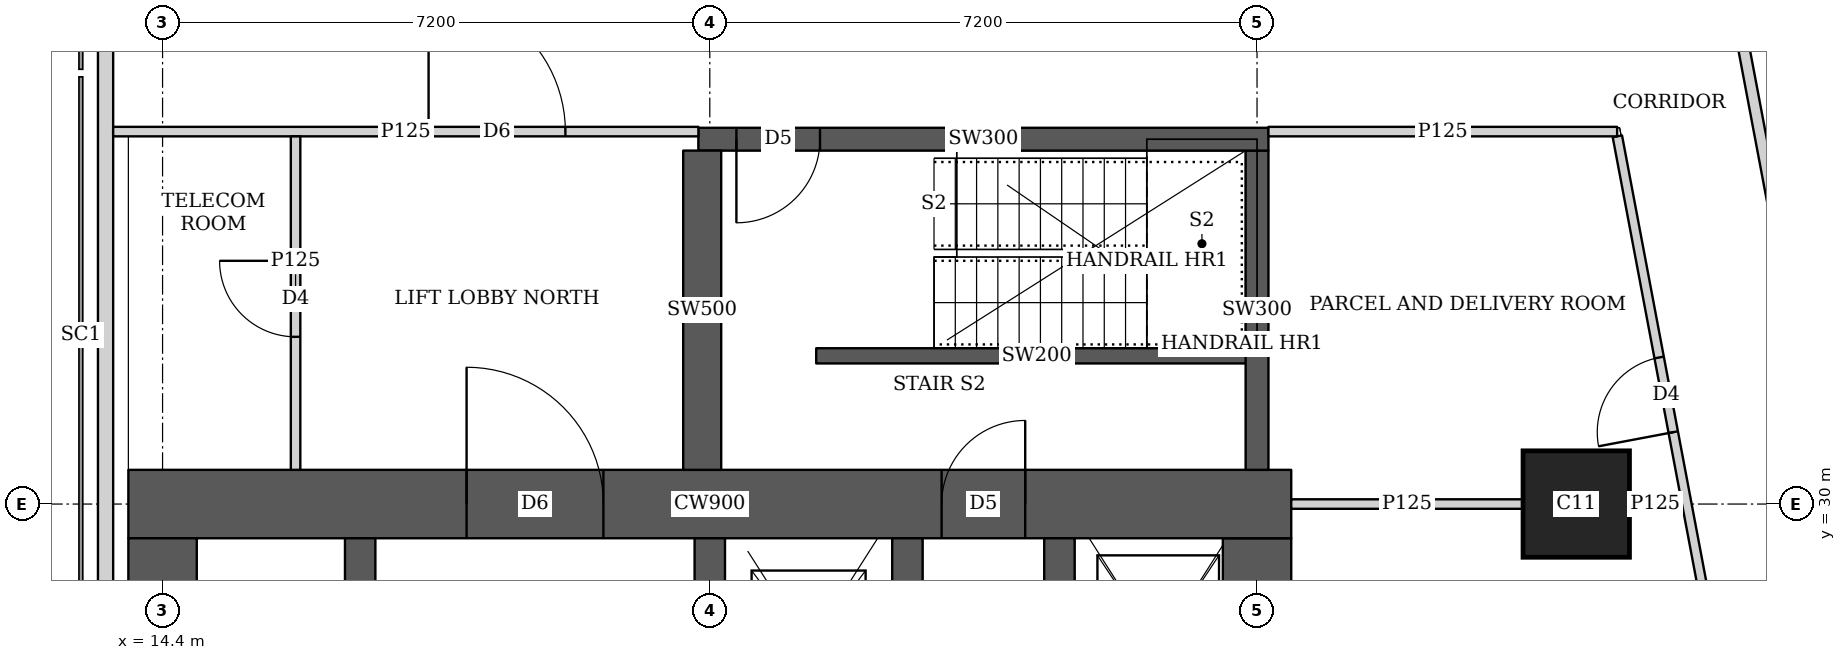
"""IFC4 building model, lengths in metres.
Left out: names, types, materials, properties, quantities, classifications, styles, units other than length and angle.
Written with IfcOpenShell. Run it as: python <this file> out.ifc"""

import sys

from ifc_helpers import new_model, si_unit, direction, frame, frame_2d, origin, origin_2d, place, context, subcontext, project, spatial, rectangle, extrude, element, fill, save


model = new_model("IFC4")
c1 = context("Model", 3, precision=1e-05, world=origin(), true_north=direction((0.0, 1.0)))
c2 = subcontext(c1, "Body", "Model", "MODEL_VIEW")
j1 = project(units=[si_unit("LENGTHUNIT", "METRE"), si_unit("PLANEANGLEUNIT", "RADIAN")], contexts=[c1])
p1 = place(None, origin())
s1 = spatial("IfcSite", under=j1, at=p1, CompositionType="ELEMENT")
p2 = place(p1, origin())
s2 = spatial("IfcBuilding", under=s1, at=p2, CompositionType="ELEMENT")
p3 = place(p2, frame((0.0, 0.0, 266.6)))
s3 = spatial("IfcBuildingStorey", under=s2, at=p3, CompositionType="ELEMENT", Elevation=266.6)
p4 = place(p3, frame((33.0, 30.0, 0.0), z_axis=(0.0, 0.0, 1.0), x_axis=(1.0, 0.0, 0.0)))
e1 = element("IfcColumn", 1, at=p4, inside=s3, PredefinedType="COLUMN", context=c2, shape_type="SweptSolid", body=[
    extrude(rectangle(XDim=1.4, YDim=1.4, at=origin_2d()), origin(), (0.0, 0.0, 1.0), 3.75),
])
p5 = place(p3, frame((13.95, 30.0, 0.0), z_axis=(0.0, 0.0, 1.0), x_axis=(1.0, 0.0, 0.0)))
e2 = element("IfcWall", 2, at=p5, inside=s3, PredefinedType="SHEAR", context=c2, shape_type="SweptSolid", body=[
    extrude(rectangle(XDim=15.3, YDim=0.9, at=frame_2d((7.65, 0.0))), origin(), (0.0, 0.0, 1.0), 3.75),
])
p6 = place(p5, frame((4.45, 0.0, 0.0)))
e3 = element("IfcOpeningElement", 3, at=p6, cuts=e2, PredefinedType="OPENING", context=c2, shape_type="SweptSolid", body=[
    extrude(rectangle(XDim=1.8, YDim=2.1, at=frame_2d((0.9, 1.05))), frame((0.0, 0.46, 0.0), z_axis=(0.0, -1.0, 0.0), x_axis=(1.0, 0.0, 0.0)), (0.0, 0.0, 1.0), 0.92),
])
p7 = place(p5, frame((10.7, 0.0, 0.0)))
e4 = element("IfcOpeningElement", 4, at=p7, cuts=e2, PredefinedType="OPENING", context=c2, shape_type="SweptSolid", body=[
    extrude(rectangle(XDim=1.1, YDim=2.1, at=frame_2d((0.55, 1.05))), frame((0.0, 0.46, 0.0), z_axis=(0.0, -1.0, 0.0), x_axis=(1.0, 0.0, 0.0)), (0.0, 0.0, 1.0), 0.92),
])
for number, where, z_axis, x_axis in (
    (5, (14.4, 15.45, 0.0), (0.0, 0.0, 1.0), (0.0, 1.0, 0.0)),
    (6, (28.8, 15.45, 0.0), (0.0, 0.0, 1.0), (0.0, 1.0, 0.0)),
):
    element("IfcWall", number, at=place(p3, frame(where, z_axis=z_axis, x_axis=x_axis)), inside=s3, PredefinedType="SHEAR", context=c2, shape_type="SweptSolid", body=[
        extrude(rectangle(XDim=14.1, YDim=0.9, at=frame_2d((7.05, 0.0))), origin(), (0.0, 0.0, 1.0), 3.75),
    ])
p8 = place(p3, frame((17.0, 15.45, 0.0), z_axis=(0.0, 0.0, 1.0), x_axis=(0.0, 1.0, 0.0)))
e7 = element("IfcWall", 7, at=p8, inside=s3, PredefinedType="SHEAR", context=c2, shape_type="SweptSolid", body=[
    extrude(rectangle(XDim=14.1, YDim=0.4, at=frame_2d((7.05, 0.0))), origin(), (0.0, 0.0, 1.0), 3.75),
])
p9 = place(p8, frame((1.05, 0.0, 0.0)))
e8 = element("IfcOpeningElement", 8, at=p9, cuts=e7, PredefinedType="OPENING", context=c2, shape_type="SweptSolid", body=[
    extrude(rectangle(XDim=1.0, YDim=2.1, at=frame_2d((0.5, 1.05))), frame((0.0, 0.21, 0.0), z_axis=(0.0, -1.0, 0.0), x_axis=(1.0, 0.0, 0.0)), (0.0, 0.0, 1.0), 0.42),
])
p10 = place(p8, frame((4.675, 0.0, 0.0)))
e9 = element("IfcOpeningElement", 9, at=p10, cuts=e7, PredefinedType="OPENING", context=c2, shape_type="SweptSolid", body=[
    extrude(rectangle(XDim=1.0, YDim=2.1, at=frame_2d((0.5, 1.05))), frame((0.0, 0.21, 0.0), z_axis=(0.0, -1.0, 0.0), x_axis=(1.0, 0.0, 0.0)), (0.0, 0.0, 1.0), 0.42),
])
p11 = place(p8, frame((8.425, 0.0, 0.0)))
e10 = element("IfcOpeningElement", 10, at=p11, cuts=e7, PredefinedType="OPENING", context=c2, shape_type="SweptSolid", body=[
    extrude(rectangle(XDim=1.0, YDim=2.1, at=frame_2d((0.5, 1.05))), frame((0.0, 0.21, 0.0), z_axis=(0.0, -1.0, 0.0), x_axis=(1.0, 0.0, 0.0)), (0.0, 0.0, 1.0), 0.42),
])
p12 = place(p8, frame((12.175, 0.0, 0.0)))
e11 = element("IfcOpeningElement", 11, at=p12, cuts=e7, PredefinedType="OPENING", context=c2, shape_type="SweptSolid", body=[
    extrude(rectangle(XDim=1.0, YDim=2.1, at=frame_2d((0.5, 1.05))), frame((0.0, 0.21, 0.0), z_axis=(0.0, -1.0, 0.0), x_axis=(1.0, 0.0, 0.0)), (0.0, 0.0, 1.0), 0.42),
])
p13 = place(p3, frame((21.6, 15.45, 0.0), z_axis=(0.0, 0.0, 1.0), x_axis=(0.0, 1.0, 0.0)))
e12 = element("IfcWall", 12, at=p13, inside=s3, PredefinedType="SHEAR", context=c2, shape_type="SweptSolid", body=[
    extrude(rectangle(XDim=14.1, YDim=0.4, at=frame_2d((7.05, 0.0))), origin(), (0.0, 0.0, 1.0), 3.75),
])
p14 = place(p13, frame((0.875, 0.0, 0.0)))
e13 = element("IfcOpeningElement", 13, at=p14, cuts=e12, PredefinedType="OPENING", context=c2, shape_type="SweptSolid", body=[
    extrude(rectangle(XDim=1.1, YDim=2.1, at=frame_2d((0.55, 1.05))), frame((0.0, 0.21, 0.0), z_axis=(0.0, -1.0, 0.0), x_axis=(1.0, 0.0, 0.0)), (0.0, 0.0, 1.0), 0.42),
])
p15 = place(p13, frame((4.625, 0.0, 0.0)))
e14 = element("IfcOpeningElement", 14, at=p15, cuts=e12, PredefinedType="OPENING", context=c2, shape_type="SweptSolid", body=[
    extrude(rectangle(XDim=1.1, YDim=2.1, at=frame_2d((0.55, 1.05))), frame((0.0, 0.21, 0.0), z_axis=(0.0, -1.0, 0.0), x_axis=(1.0, 0.0, 0.0)), (0.0, 0.0, 1.0), 0.42),
])
p16 = place(p13, frame((8.375, 0.0, 0.0)))
e15 = element("IfcOpeningElement", 15, at=p16, cuts=e12, PredefinedType="OPENING", context=c2, shape_type="SweptSolid", body=[
    extrude(rectangle(XDim=1.1, YDim=2.1, at=frame_2d((0.55, 1.05))), frame((0.0, 0.21, 0.0), z_axis=(0.0, -1.0, 0.0), x_axis=(1.0, 0.0, 0.0)), (0.0, 0.0, 1.0), 0.42),
])
p17 = place(p13, frame((12.125, 0.0, 0.0)))
e16 = element("IfcOpeningElement", 16, at=p17, cuts=e12, PredefinedType="OPENING", context=c2, shape_type="SweptSolid", body=[
    extrude(rectangle(XDim=1.1, YDim=2.1, at=frame_2d((0.55, 1.05))), frame((0.0, 0.21, 0.0), z_axis=(0.0, -1.0, 0.0), x_axis=(1.0, 0.0, 0.0)), (0.0, 0.0, 1.0), 0.42),
])
p18 = place(p3, frame((24.2, 15.45, 0.0), z_axis=(0.0, 0.0, 1.0), x_axis=(0.0, 1.0, 0.0)))
e17 = element("IfcWall", 17, at=p18, inside=s3, PredefinedType="SHEAR", context=c2, shape_type="SweptSolid", body=[
    extrude(rectangle(XDim=14.1, YDim=0.4, at=frame_2d((7.05, 0.0))), origin(), (0.0, 0.0, 1.0), 3.75),
])
p19 = place(p3, frame((26.2, 26.45, 0.0), z_axis=(0.0, 0.0, 1.0), x_axis=(0.0, 1.0, 0.0)))
e18 = element("IfcWall", 18, at=p19, inside=s3, PredefinedType="SHEAR", context=c2, shape_type="SweptSolid", body=[
    extrude(rectangle(XDim=3.1, YDim=0.4, at=frame_2d((1.55, 0.0))), origin(), (0.0, 0.0, 1.0), 3.75),
])
p20 = place(p19, frame((1.075, 0.0, 0.0)))
e19 = element("IfcOpeningElement", 19, at=p20, cuts=e18, PredefinedType="OPENING", context=c2, shape_type="SweptSolid", body=[
    extrude(rectangle(XDim=1.2, YDim=2.1, at=frame_2d((0.6, 1.05))), frame((0.0, 0.21, 0.0), z_axis=(0.0, -1.0, 0.0), x_axis=(1.0, 0.0, 0.0)), (0.0, 0.0, 1.0), 0.42),
])
p21 = place(p3, frame((21.45, 34.8, 0.0), z_axis=(0.0, 0.0, 1.0), x_axis=(1.0, 0.0, 0.0)))
e20 = element("IfcWall", 20, at=p21, inside=s3, PredefinedType="SHEAR", context=c2, shape_type="SweptSolid", body=[
    extrude(rectangle(XDim=7.5, YDim=0.3, at=frame_2d((3.75, 0.0))), origin(), (0.0, 0.0, 1.0), 3.75),
])
p22 = place(p21, frame((0.5, 0.0, 0.0)))
e21 = element("IfcOpeningElement", 21, at=p22, cuts=e20, PredefinedType="OPENING", context=c2, shape_type="SweptSolid", body=[
    extrude(rectangle(XDim=1.1, YDim=2.1, at=frame_2d((0.55, 1.05))), frame((0.0, 0.16, 0.0), z_axis=(0.0, -1.0, 0.0), x_axis=(1.0, 0.0, 0.0)), (0.0, 0.0, 1.0), 0.32),
])
p23 = place(p3, frame((21.5, 30.45, 0.0), z_axis=(0.0, 0.0, 1.0), x_axis=(0.0, 1.0, 0.0)))
e22 = element("IfcWall", 22, at=p23, inside=s3, PredefinedType="SHEAR", context=c2, shape_type="SweptSolid", body=[
    extrude(rectangle(XDim=4.2, YDim=0.5, at=frame_2d((2.1, 0.0))), origin(), (0.0, 0.0, 1.0), 3.75),
])
p24 = place(p3, frame((28.8, 30.45, 0.0), z_axis=(0.0, 0.0, 1.0), x_axis=(0.0, 1.0, 0.0)))
e23 = element("IfcWall", 23, at=p24, inside=s3, PredefinedType="SHEAR", context=c2, shape_type="SweptSolid", body=[
    extrude(rectangle(XDim=4.2, YDim=0.3, at=frame_2d((2.1, 0.0))), origin(), (0.0, 0.0, 1.0), 3.75),
])
p25 = place(p3, frame((13.65, 43.037, 0.0), z_axis=(0.0, 0.0, 1.0), x_axis=(0.0, -1.0, 0.0)))
e24 = element("IfcWall", 24, at=p25, inside=s3, PredefinedType="SOLIDWALL", context=c2, shape_type="SweptSolid", body=[
    extrude(rectangle(XDim=35.374, YDim=0.2, at=frame_2d((17.687, 0.0))), origin(), (0.0, 0.0, 1.0), 3.5),
])
p26 = place(p25, frame((1.959, 0.0, 0.9)))
e25 = element("IfcOpeningElement", 25, at=p26, cuts=e24, PredefinedType="OPENING", context=c2, shape_type="SweptSolid", body=[
    extrude(rectangle(XDim=1.8, YDim=1.5, at=frame_2d((0.9, 0.75))), frame((0.0, 0.11, 0.0), z_axis=(0.0, -1.0, 0.0), x_axis=(1.0, 0.0, 0.0)), (0.0, 0.0, 1.0), 0.22),
])
p27 = place(p3, frame((34.036, 42.186, 0.0), z_axis=(0.0, 0.0, 1.0), x_axis=(0.185593518645, -0.9826266055, 0.0)))
e26 = element("IfcWall", 26, at=p27, inside=s3, PredefinedType="SOLIDWALL", context=c2, shape_type="SweptSolid", body=[
    extrude(rectangle(XDim=35.961, YDim=0.15, at=frame_2d((17.98, 0.0))), origin(), (0.0, 0.0, 1.0), 2.5),
])
p28 = place(p27, frame((15.529, 0.0, 0.0)))
e27 = element("IfcOpeningElement", 27, at=p28, cuts=e26, PredefinedType="OPENING", context=c2, shape_type="SweptSolid", body=[
    extrude(rectangle(XDim=1.0, YDim=2.1, at=frame_2d((0.5, 1.05))), frame((0.0, 0.085, 0.0), z_axis=(0.0, -1.0, 0.0), x_axis=(1.0, 0.0, 0.0)), (0.0, 0.0, 1.0), 0.17),
])
p29 = place(p27, frame((19.345, 0.0, 0.0)))
e28 = element("IfcOpeningElement", 28, at=p29, cuts=e26, PredefinedType="OPENING", context=c2, shape_type="SweptSolid", body=[
    extrude(rectangle(XDim=1.0, YDim=2.1, at=frame_2d((0.5, 1.05))), frame((0.0, 0.085, 0.0), z_axis=(0.0, -1.0, 0.0), x_axis=(1.0, 0.0, 0.0)), (0.0, 0.0, 1.0), 0.17),
])
p30 = place(p27, frame((30.594, 0.0, 0.0)))
e29 = element("IfcOpeningElement", 29, at=p30, cuts=e26, PredefinedType="OPENING", context=c2, shape_type="SweptSolid", body=[
    extrude(rectangle(XDim=1.0, YDim=2.1, at=frame_2d((0.5, 1.05))), frame((0.0, 0.085, 0.0), z_axis=(0.0, -1.0, 0.0), x_axis=(1.0, 0.0, 0.0)), (0.0, 0.0, 1.0), 0.17),
])
p31 = place(p3, frame((13.75, 34.9, 0.0), z_axis=(0.0, 0.0, 1.0), x_axis=(1.0, 0.0, 0.0)))
e30 = element("IfcWall", 30, at=p31, inside=s3, PredefinedType="PARTITIONING", context=c2, shape_type="SweptSolid", body=[
    extrude(rectangle(XDim=7.7, YDim=0.125, at=frame_2d((3.85, 0.0))), origin(), (0.0, 0.0, 1.0), 3.5),
])
p32 = place(p31, frame((4.15, 0.0, 0.0)))
e31 = element("IfcOpeningElement", 31, at=p32, cuts=e30, PredefinedType="OPENING", context=c2, shape_type="SweptSolid", body=[
    extrude(rectangle(XDim=1.8, YDim=2.1, at=frame_2d((0.9, 1.05))), frame((0.0, 0.073, 0.0), z_axis=(0.0, -1.0, 0.0), x_axis=(1.0, 0.0, 0.0)), (0.0, 0.0, 1.0), 0.145),
])
p33 = place(p3, frame((16.15, 30.45, 0.0), z_axis=(0.0, 0.0, 1.0), x_axis=(0.0, 1.0, 0.0)))
e32 = element("IfcWall", 32, at=p33, inside=s3, PredefinedType="PARTITIONING", context=c2, shape_type="SweptSolid", body=[
    extrude(rectangle(XDim=4.387, YDim=0.125, at=frame_2d((2.193, 0.0))), origin(), (0.0, 0.0, 1.0), 3.5),
])
p34 = place(p33, frame((1.75, 0.0, 0.0)))
e33 = element("IfcOpeningElement", 33, at=p34, cuts=e32, PredefinedType="OPENING", context=c2, shape_type="SweptSolid", body=[
    extrude(rectangle(XDim=1.0, YDim=2.1, at=frame_2d((0.5, 1.05))), frame((0.0, 0.073, 0.0), z_axis=(0.0, -1.0, 0.0), x_axis=(1.0, 0.0, 0.0)), (0.0, 0.0, 1.0), 0.145),
])
p35 = place(p3, frame((28.95, 34.9, 0.0), z_axis=(0.0, 0.0, 1.0), x_axis=(1.0, 0.0, 0.0)))
e34 = element("IfcWall", 34, at=p35, inside=s3, PredefinedType="PARTITIONING", context=c2, shape_type="SweptSolid", body=[
    extrude(rectangle(XDim=4.588, YDim=0.125, at=frame_2d((2.294, 0.0))), origin(), (0.0, 0.0, 1.0), 3.5),
])
p36 = place(p3, frame((38.202, 10.163, 0.0), z_axis=(0.0, 0.0, 1.0), x_axis=(-0.185610321132, 0.982623431783, 0.0)))
e35 = element("IfcWall", 35, at=p36, inside=s3, PredefinedType="PARTITIONING", context=c2, shape_type="SweptSolid", body=[
    extrude(rectangle(XDim=25.111, YDim=0.125, at=frame_2d((12.556, 0.0))), origin(), (0.0, 0.0, 1.0), 2.5),
])
p37 = place(p36, frame((0.708, 0.0, 0.0)))
e36 = element("IfcOpeningElement", 36, at=p37, cuts=e35, PredefinedType="OPENING", context=c2, shape_type="SweptSolid", body=[
    extrude(rectangle(XDim=1.0, YDim=2.1, at=frame_2d((0.5, 1.05))), frame((0.0, 0.073, 0.0), z_axis=(0.0, -1.0, 0.0), x_axis=(1.0, 0.0, 0.0)), (0.0, 0.0, 1.0), 0.145),
])
p38 = place(p36, frame((5.9, 0.0, 0.0)))
e37 = element("IfcOpeningElement", 37, at=p38, cuts=e35, PredefinedType="OPENING", context=c2, shape_type="SweptSolid", body=[
    extrude(rectangle(XDim=1.0, YDim=2.1, at=frame_2d((0.5, 1.05))), frame((0.0, 0.073, 0.0), z_axis=(0.0, -1.0, 0.0), x_axis=(1.0, 0.0, 0.0)), (0.0, 0.0, 1.0), 0.145),
])
p39 = place(p36, frame((13.378, 0.0, 0.0)))
e38 = element("IfcOpeningElement", 38, at=p39, cuts=e35, PredefinedType="OPENING", context=c2, shape_type="SweptSolid", body=[
    extrude(rectangle(XDim=1.0, YDim=2.1, at=frame_2d((0.5, 1.05))), frame((0.0, 0.073, 0.0), z_axis=(0.0, -1.0, 0.0), x_axis=(1.0, 0.0, 0.0)), (0.0, 0.0, 1.0), 0.145),
])
p40 = place(p36, frame((17.194, 0.0, 0.0)))
e39 = element("IfcOpeningElement", 39, at=p40, cuts=e35, PredefinedType="OPENING", context=c2, shape_type="SweptSolid", body=[
    extrude(rectangle(XDim=1.0, YDim=2.1, at=frame_2d((0.5, 1.05))), frame((0.0, 0.073, 0.0), z_axis=(0.0, -1.0, 0.0), x_axis=(1.0, 0.0, 0.0)), (0.0, 0.0, 1.0), 0.145),
])
p41 = place(p36, frame((21.15, 0.0, 0.0)))
e40 = element("IfcOpeningElement", 40, at=p41, cuts=e35, PredefinedType="OPENING", context=c2, shape_type="SweptSolid", body=[
    extrude(rectangle(XDim=1.0, YDim=2.1, at=frame_2d((0.5, 1.05))), frame((0.0, 0.073, 0.0), z_axis=(0.0, -1.0, 0.0), x_axis=(1.0, 0.0, 0.0)), (0.0, 0.0, 1.0), 0.145),
])
p42 = place(p3, frame((29.25, 30.0, 0.0), z_axis=(0.0, 0.0, 1.0), x_axis=(1.0, 0.0, 0.0)))
e41 = element("IfcWall", 41, at=p42, inside=s3, PredefinedType="PARTITIONING", context=c2, shape_type="SweptSolid", body=[
    extrude(rectangle(XDim=3.049, YDim=0.125, at=frame_2d((1.524, 0.0))), origin(), (0.0, 0.0, 1.0), 3.5),
])
p43 = place(p3, frame((33.701, 30.0, 0.0), z_axis=(0.0, 0.0, 1.0), x_axis=(1.0, 0.0, 0.0)))
e42 = element("IfcWall", 42, at=p43, inside=s3, PredefinedType="PARTITIONING", context=c2, shape_type="SweptSolid", body=[
    extrude(rectangle(XDim=0.678, YDim=0.125, at=frame_2d((0.339, 0.0))), origin(), (0.0, 0.0, 1.0), 2.5),
])
p44 = place(p3, frame((23.0, 31.95, 0.0), z_axis=(0.0, 0.0, 1.0), x_axis=(1.0, 0.0, 0.0)))
e43 = element("IfcWall", 43, at=p44, inside=s3, PredefinedType="SHEAR", context=c2, shape_type="SweptSolid", body=[
    extrude(rectangle(XDim=5.8, YDim=0.2, at=frame_2d((2.9, 0.0))), origin(), (0.0, 0.0, 1.0), 3.75),
])
p45 = place(p34, origin())
e44 = element("IfcDoor", 44, at=p45, inside=s3, OperationType="SINGLE_SWING_RIGHT", PredefinedType="DOOR", context=c2, shape_type="SweptSolid", body=[
    extrude(rectangle(XDim=1.0, YDim=2.1, at=frame_2d((0.5, 1.05))), frame((0.0, 0.025, 0.0), z_axis=(0.0, -1.0, 0.0), x_axis=(1.0, 0.0, 0.0)), (0.0, 0.0, 1.0), 0.05),
])
fill(e33, e44)
p46 = place(p32, origin())
e45 = element("IfcDoor", 45, at=p46, inside=s3, OperationType="DOUBLE_DOOR_SINGLE_SWING", PredefinedType="DOOR", context=c2, shape_type="SweptSolid", body=[
    extrude(rectangle(XDim=1.8, YDim=2.1, at=frame_2d((0.9, 1.05))), frame((0.0, 0.025, 0.0), z_axis=(0.0, -1.0, 0.0), x_axis=(1.0, 0.0, 0.0)), (0.0, 0.0, 1.0), 0.05),
])
fill(e31, e45)
p47 = place(p41, origin())
e46 = element("IfcDoor", 46, at=p47, inside=s3, OperationType="SINGLE_SWING_LEFT", PredefinedType="DOOR", context=c2, shape_type="SweptSolid", body=[
    extrude(rectangle(XDim=1.0, YDim=2.1, at=frame_2d((0.5, 1.05))), frame((0.0, 0.025, 0.0), z_axis=(0.0, -1.0, 0.0), x_axis=(1.0, 0.0, 0.0)), (0.0, 0.0, 1.0), 0.05),
])
fill(e40, e46)
p48 = place(p6, origin())
e47 = element("IfcDoor", 47, at=p48, inside=s3, OperationType="DOUBLE_DOOR_SINGLE_SWING", PredefinedType="DOOR", context=c2, shape_type="SweptSolid", body=[
    extrude(rectangle(XDim=1.8, YDim=2.1, at=frame_2d((0.9, 1.05))), frame((0.0, 0.025, 0.0), z_axis=(0.0, -1.0, 0.0), x_axis=(1.0, 0.0, 0.0)), (0.0, 0.0, 1.0), 0.05),
])
fill(e3, e47)
p49 = place(p7, origin())
e48 = element("IfcDoor", 48, at=p49, inside=s3, OperationType="SINGLE_SWING_RIGHT", PredefinedType="DOOR", context=c2, shape_type="SweptSolid", body=[
    extrude(rectangle(XDim=1.1, YDim=2.1, at=frame_2d((0.55, 1.05))), frame((0.0, 0.025, 0.0), z_axis=(0.0, -1.0, 0.0), x_axis=(1.0, 0.0, 0.0)), (0.0, 0.0, 1.0), 0.05),
])
fill(e4, e48)
p50 = place(p22, origin())
e49 = element("IfcDoor", 49, at=p50, inside=s3, OperationType="SINGLE_SWING_RIGHT", PredefinedType="DOOR", context=c2, shape_type="SweptSolid", body=[
    extrude(rectangle(XDim=1.1, YDim=2.1, at=frame_2d((0.55, 1.05))), frame((0.0, 0.025, 0.0), z_axis=(0.0, -1.0, 0.0), x_axis=(1.0, 0.0, 0.0)), (0.0, 0.0, 1.0), 0.05),
])
fill(e21, e49)
save(model, sys.argv[1])
